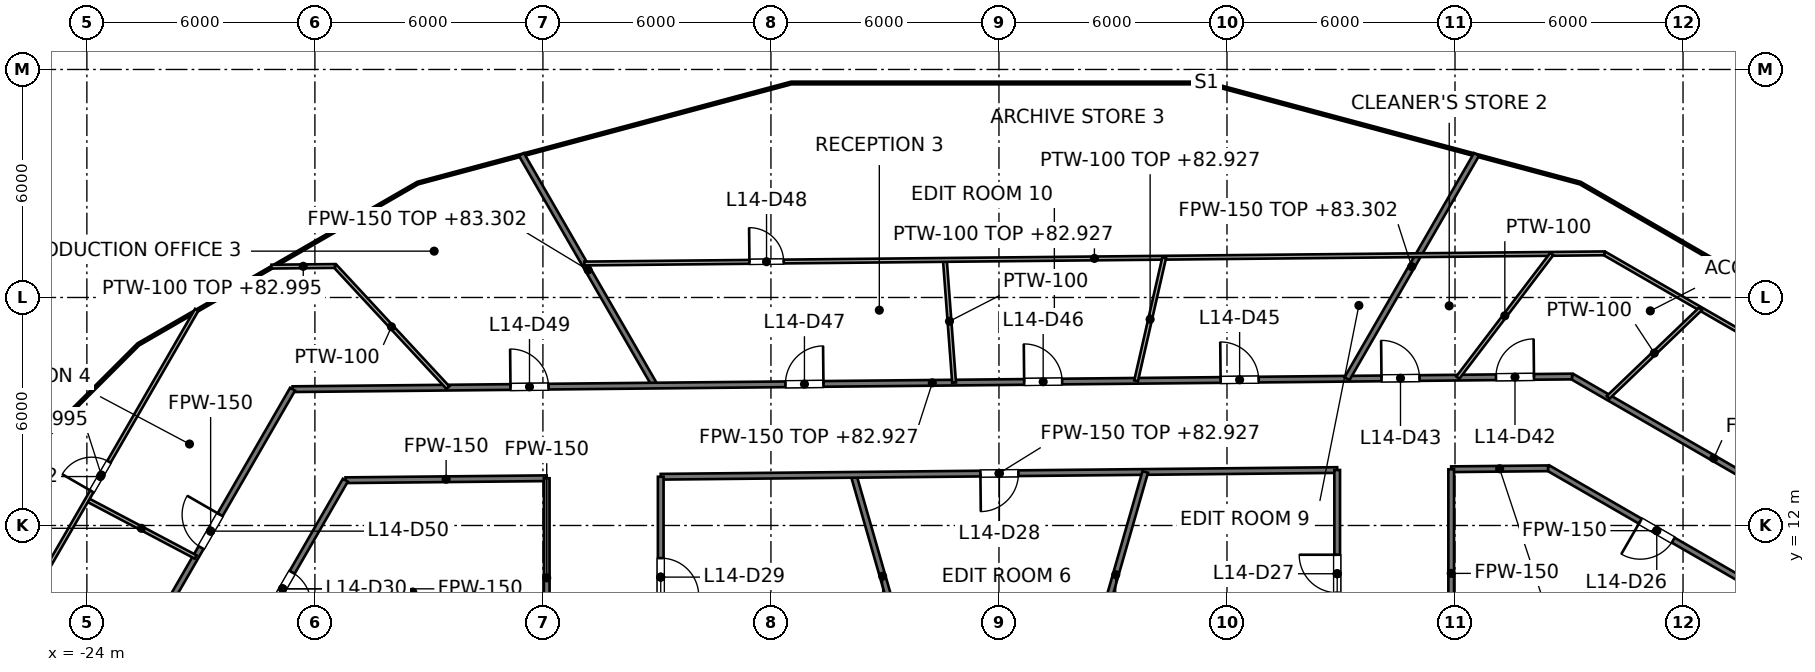
"""IFC4 building model, lengths in metres.
Left out: names, types, materials, properties, quantities, classifications, styles, units other than length and angle.
Written with IfcOpenShell. Run it as: python <this file> out.ifc"""

import sys

from ifc_helpers import new_model, si_unit, direction, frame, frame_2d, origin, place, context, subcontext, project, spatial, rectangle, extrude, element, fill, save


model = new_model("IFC4")
c1 = context("Model", 3, precision=1e-05, world=origin(), true_north=direction((0.0, 1.0)))
c2 = subcontext(c1, "Body", "Model", "MODEL_VIEW")
j1 = project(units=[si_unit("LENGTHUNIT", "METRE"), si_unit("PLANEANGLEUNIT", "RADIAN")], contexts=[c1])
p1 = place(None, origin())
s1 = spatial("IfcSite", under=j1, at=p1, CompositionType="ELEMENT")
p2 = place(p1, origin())
s2 = spatial("IfcBuilding", under=s1, at=p2, CompositionType="ELEMENT")
p3 = place(p2, frame((0.0, 0.0, 79.8)))
s3 = spatial("IfcBuildingStorey", under=s2, at=p3, CompositionType="ELEMENT", Elevation=79.8)
p4 = place(p3, frame((-3.827, 13.333, 0.0), z_axis=(0.0, 0.0, 1.0), x_axis=(0.275935525478, -0.961176147113, 0.0)))
e1 = element("IfcWall", 1, at=p4, inside=s3, PredefinedType="PARTITIONING", context=c2, shape_type="SweptSolid", body=[
    extrude(rectangle(XDim=5.548, YDim=0.15, at=frame_2d((2.774, 0.0))), origin(), (0.0, 0.0, 1.0), 4.05),
])
p5 = place(p3, frame((-12.565, 21.763, 0.0), z_axis=(0.0, 0.0, 1.0), x_axis=(0.500009374365, -0.866019991425, 0.0)))
e2 = element("IfcWall", 2, at=p5, inside=s3, PredefinedType="PARTITIONING", context=c2, shape_type="SweptSolid", body=[
    extrude(rectangle(XDim=7.022, YDim=0.15, at=frame_2d((3.511, 0.0))), origin(), (0.0, 0.0, 1.0), 3.502),
])
p6 = place(p3, frame((14.448, 13.515, 0.0), z_axis=(0.0, 0.0, 1.0), x_axis=(0.865975016585, -0.500087263036, 0.0)))
e3 = element("IfcWall", 3, at=p6, inside=s3, PredefinedType="PARTITIONING", context=c2, shape_type="SweptSolid", body=[
    extrude(rectangle(XDim=6.604, YDim=0.15, at=frame_2d((3.302, 0.0))), origin(), (0.0, 0.0, 1.0), 3.195),
])
p7 = place(p6, frame((2.803, 0.0, 0.0)))
e4 = element("IfcOpeningElement", 4, at=p7, cuts=e3, PredefinedType="OPENING", context=c2, shape_type="SweptSolid", body=[
    extrude(rectangle(XDim=1.0, YDim=2.1, at=frame_2d((0.5, 1.05))), frame((0.0, 0.075, 0.0), z_axis=(0.0, -1.0, 0.0), x_axis=(1.0, 0.0, 0.0)), (0.0, 0.0, 1.0), 0.15),
])
p8 = place(p3, frame((15.08, 15.921, 0.0), z_axis=(0.0, 0.0, 1.0), x_axis=(0.865982112089, -0.50007497592, 0.0)))
e5 = element("IfcWall", 5, at=p8, inside=s3, PredefinedType="PARTITIONING", context=c2, shape_type="SweptSolid", body=[
    extrude(rectangle(XDim=8.613, YDim=0.15, at=frame_2d((4.306, 0.0))), origin(), (0.0, 0.0, 1.0), 3.195),
])
p9 = place(p3, frame((-17.194, 13.191, 0.0), z_axis=(0.0, 0.0, 1.0), x_axis=(0.999950853109, 0.009914200296, 0.0)))
e6 = element("IfcWall", 6, at=p9, inside=s3, PredefinedType="PARTITIONING", context=c2, shape_type="SweptSolid", body=[
    extrude(rectangle(XDim=5.294, YDim=0.15, at=frame_2d((2.647, 0.0))), origin(), (0.0, 0.0, 1.0), 3.195),
])
p10 = place(p3, frame((-8.9, 13.282, 0.0), z_axis=(0.0, 0.0, 1.0), x_axis=(0.999950969978, 0.009902405776, 0.0)))
e7 = element("IfcWall", 7, at=p10, inside=s3, PredefinedType="PARTITIONING", context=c2, shape_type="SweptSolid", body=[
    extrude(rectangle(XDim=17.801, YDim=0.15, at=frame_2d((8.9, 0.0))), origin(), (0.0, 0.0, 1.0), 3.127),
])
p11 = place(p10, frame((8.412, 0.0, 0.0)))
e8 = element("IfcOpeningElement", 8, at=p11, cuts=e7, PredefinedType="OPENING", context=c2, shape_type="SweptSolid", body=[
    extrude(rectangle(XDim=1.0, YDim=2.1, at=frame_2d((0.5, 1.05))), frame((0.0, 0.075, 0.0), z_axis=(0.0, -1.0, 0.0), x_axis=(1.0, 0.0, 0.0)), (0.0, 0.0, 1.0), 0.15),
])
p12 = place(p3, frame((11.9, 13.48, 0.0), z_axis=(0.0, 0.0, 1.0), x_axis=(0.999951307579, 0.009868255694, 0.0)))
e9 = element("IfcWall", 9, at=p12, inside=s3, PredefinedType="PARTITIONING", context=c2, shape_type="SweptSolid", body=[
    extrude(rectangle(XDim=2.548, YDim=0.15, at=frame_2d((1.274, 0.0))), origin(), (0.0, 0.0, 1.0), 3.195),
])
p13 = place(p3, frame((-18.587, 15.587, 0.0), z_axis=(0.0, 0.0, 1.0), x_axis=(0.999950941879, 0.009905242833, 0.0)))
e10 = element("IfcWall", 10, at=p13, inside=s3, PredefinedType="PARTITIONING", context=c2, shape_type="SweptSolid", body=[
    extrude(rectangle(XDim=33.669, YDim=0.15, at=frame_2d((16.834, 0.0))), origin(), (0.0, 0.0, 1.0), 3.127),
])
p14 = place(p13, frame((31.667, 0.0, 0.0)))
e11 = element("IfcOpeningElement", 11, at=p14, cuts=e10, PredefinedType="OPENING", context=c2, shape_type="SweptSolid", body=[
    extrude(rectangle(XDim=1.0, YDim=2.1, at=frame_2d((0.5, 1.05))), frame((0.0, 0.075, 0.0), z_axis=(0.0, -1.0, 0.0), x_axis=(1.0, 0.0, 0.0)), (0.0, 0.0, 1.0), 0.15),
])
p15 = place(p13, frame((28.654, 0.0, 0.0)))
e12 = element("IfcOpeningElement", 12, at=p15, cuts=e10, PredefinedType="OPENING", context=c2, shape_type="SweptSolid", body=[
    extrude(rectangle(XDim=1.0, YDim=2.1, at=frame_2d((0.5, 1.05))), frame((0.0, 0.075, 0.0), z_axis=(0.0, -1.0, 0.0), x_axis=(1.0, 0.0, 0.0)), (0.0, 0.0, 1.0), 0.15),
])
p16 = place(p13, frame((24.421, 0.0, 0.0)))
e13 = element("IfcOpeningElement", 13, at=p16, cuts=e10, PredefinedType="OPENING", context=c2, shape_type="SweptSolid", body=[
    extrude(rectangle(XDim=1.0, YDim=2.1, at=frame_2d((0.5, 1.05))), frame((0.0, 0.075, 0.0), z_axis=(0.0, -1.0, 0.0), x_axis=(1.0, 0.0, 0.0)), (0.0, 0.0, 1.0), 0.15),
])
p17 = place(p13, frame((19.251, 0.0, 0.0)))
e14 = element("IfcOpeningElement", 14, at=p17, cuts=e10, PredefinedType="OPENING", context=c2, shape_type="SweptSolid", body=[
    extrude(rectangle(XDim=1.0, YDim=2.1, at=frame_2d((0.5, 1.05))), frame((0.0, 0.075, 0.0), z_axis=(0.0, -1.0, 0.0), x_axis=(1.0, 0.0, 0.0)), (0.0, 0.0, 1.0), 0.15),
])
p18 = place(p13, frame((12.969, 0.0, 0.0)))
e15 = element("IfcOpeningElement", 15, at=p18, cuts=e10, PredefinedType="OPENING", context=c2, shape_type="SweptSolid", body=[
    extrude(rectangle(XDim=1.0, YDim=2.1, at=frame_2d((0.5, 1.05))), frame((0.0, 0.075, 0.0), z_axis=(0.0, -1.0, 0.0), x_axis=(1.0, 0.0, 0.0)), (0.0, 0.0, 1.0), 0.15),
])
p19 = place(p13, frame((5.734, 0.0, 0.0)))
e16 = element("IfcOpeningElement", 16, at=p19, cuts=e10, PredefinedType="OPENING", context=c2, shape_type="SweptSolid", body=[
    extrude(rectangle(XDim=1.0, YDim=2.1, at=frame_2d((0.5, 1.05))), frame((0.0, 0.075, 0.0), z_axis=(0.0, -1.0, 0.0), x_axis=(1.0, 0.0, 0.0)), (0.0, 0.0, 1.0), 0.15),
])
p20 = place(p3, frame((9.158, 15.862, 0.0), z_axis=(0.0, 0.0, 1.0), x_axis=(0.499996416451, 0.866027472737, 0.0)))
e17 = element("IfcWall", 17, at=p20, inside=s3, PredefinedType="PARTITIONING", context=c2, shape_type="SweptSolid", body=[
    extrude(rectangle(XDim=6.814, YDim=0.15, at=frame_2d((3.407, 0.0))), origin(), (0.0, 0.0, 1.0), 3.502),
])
p21 = place(p3, frame((-20.5, 7.474, 0.0), z_axis=(0.0, 0.0, 1.0), x_axis=(0.500012665616, 0.866018091164, 0.0)))
e18 = element("IfcWall", 18, at=p21, inside=s3, PredefinedType="PARTITIONING", context=c2, shape_type="SweptSolid", body=[
    extrude(rectangle(XDim=6.602, YDim=0.15, at=frame_2d((3.301, 0.0))), origin(), (0.0, 0.0, 1.0), 3.195),
])
p22 = place(p21, frame((2.803, 0.0, 0.0)))
e19 = element("IfcOpeningElement", 19, at=p22, cuts=e18, PredefinedType="OPENING", context=c2, shape_type="SweptSolid", body=[
    extrude(rectangle(XDim=1.0, YDim=2.1, at=frame_2d((0.5, 1.05))), frame((0.0, 0.075, 0.0), z_axis=(0.0, -1.0, 0.0), x_axis=(1.0, 0.0, 0.0)), (0.0, 0.0, 1.0), 0.15),
])
p23 = place(p3, frame((-22.9, 8.117, 0.0), z_axis=(0.0, 0.0, 1.0), x_axis=(0.499983791763, 0.866034761412, 0.0)))
e20 = element("IfcWall", 20, at=p23, inside=s3, PredefinedType="PARTITIONING", context=c2, shape_type="SweptSolid", body=[
    extrude(rectangle(XDim=8.626, YDim=0.15, at=frame_2d((4.313, 0.0))), origin(), (0.0, 0.0, 1.0), 3.195),
])
p24 = place(p23, frame((3.812, 0.0, 0.0)))
e21 = element("IfcOpeningElement", 21, at=p24, cuts=e20, PredefinedType="OPENING", context=c2, shape_type="SweptSolid", body=[
    extrude(rectangle(XDim=1.0, YDim=2.1, at=frame_2d((0.5, 1.05))), frame((0.0, 0.075, 0.0), z_axis=(0.0, -1.0, 0.0), x_axis=(1.0, 0.0, 0.0)), (0.0, 0.0, 1.0), 0.15),
])
p25 = place(p23, frame((1.213, 0.0, 0.0)))
e22 = element("IfcOpeningElement", 22, at=p25, cuts=e20, PredefinedType="OPENING", context=c2, shape_type="SweptSolid", body=[
    extrude(rectangle(XDim=1.0, YDim=2.1, at=frame_2d((0.5, 1.05))), frame((0.0, 0.075, 0.0), z_axis=(0.0, -1.0, 0.0), x_axis=(1.0, 0.0, 0.0)), (0.0, 0.0, 1.0), 0.15),
])
p26 = place(p3, frame((2.296, 8.0, 0.0), z_axis=(0.0, 0.0, 1.0), x_axis=(0.275958345059, 0.961169595749, 0.0)))
e23 = element("IfcWall", 23, at=p26, inside=s3, PredefinedType="PARTITIONING", context=c2, shape_type="SweptSolid", body=[
    extrude(rectangle(XDim=5.628, YDim=0.15, at=frame_2d((2.814, 0.0))), origin(), (0.0, 0.0, 1.0), 4.05),
])
p27 = place(p3, frame((11.9, 8.0, 0.0), z_axis=(0.0, 0.0, 1.0), x_axis=(0.0, 1.0, 0.0)))
e24 = element("IfcWall", 24, at=p27, inside=s3, PredefinedType="PARTITIONING", context=c2, shape_type="SweptSolid", body=[
    extrude(rectangle(XDim=5.479, YDim=0.15, at=frame_2d((2.74, 0.0))), origin(), (0.0, 0.0, 1.0), 3.195),
])
p28 = place(p3, frame((8.9, 8.0, 0.0), z_axis=(0.0, 0.0, 1.0), x_axis=(0.0, 1.0, 0.0)))
e25 = element("IfcWall", 25, at=p28, inside=s3, PredefinedType="PARTITIONING", context=c2, shape_type="SweptSolid", body=[
    extrude(rectangle(XDim=5.46, YDim=0.15, at=frame_2d((2.73, 0.0))), origin(), (0.0, 0.0, 1.0), 3.127),
])
p29 = place(p28, frame((2.23, 0.0, 0.0)))
e26 = element("IfcOpeningElement", 26, at=p29, cuts=e25, PredefinedType="OPENING", context=c2, shape_type="SweptSolid", body=[
    extrude(rectangle(XDim=1.0, YDim=2.1, at=frame_2d((0.5, 1.05))), frame((0.0, 0.075, 0.0), z_axis=(0.0, -1.0, 0.0), x_axis=(1.0, 0.0, 0.0)), (0.0, 0.0, 1.0), 0.15),
])
p30 = place(p3, frame((-8.9, 8.0, 0.0), z_axis=(0.0, 0.0, 1.0), x_axis=(0.0, 1.0, 0.0)))
e27 = element("IfcWall", 27, at=p30, inside=s3, PredefinedType="PARTITIONING", context=c2, shape_type="SweptSolid", body=[
    extrude(rectangle(XDim=5.283, YDim=0.15, at=frame_2d((2.642, 0.0))), origin(), (0.0, 0.0, 1.0), 3.127),
])
p31 = place(p30, frame((2.142, 0.0, 0.0)))
e28 = element("IfcOpeningElement", 28, at=p31, cuts=e27, PredefinedType="OPENING", context=c2, shape_type="SweptSolid", body=[
    extrude(rectangle(XDim=1.0, YDim=2.1, at=frame_2d((0.5, 1.05))), frame((0.0, 0.075, 0.0), z_axis=(0.0, -1.0, 0.0), x_axis=(1.0, 0.0, 0.0)), (0.0, 0.0, 1.0), 0.15),
])
p32 = place(p3, frame((-11.9, 8.0, 0.0), z_axis=(0.0, 0.0, 1.0), x_axis=(0.0, 1.0, 0.0)))
e29 = element("IfcWall", 29, at=p32, inside=s3, PredefinedType="PARTITIONING", context=c2, shape_type="SweptSolid", body=[
    extrude(rectangle(XDim=5.243, YDim=0.15, at=frame_2d((2.622, 0.0))), origin(), (0.0, 0.0, 1.0), 3.195),
])
p33 = place(p3, frame((-1.423, 18.988, 0.0), z_axis=(0.0, 0.0, 1.0), x_axis=(0.074816197408, -0.997197340854, 0.0)))
e30 = element("IfcWall", 30, at=p33, inside=s3, PredefinedType="PARTITIONING", context=c2, shape_type="SweptSolid", body=[
    extrude(rectangle(XDim=3.237, YDim=0.1, at=frame_2d((1.619, 0.0))), origin(), (0.0, 0.0, 1.0), 4.05),
])
p34 = place(p3, frame((-17.47, 18.829, 0.0), z_axis=(0.0, 0.0, 1.0), x_axis=(0.680137944576, -0.73308415366, 0.0)))
e31 = element("IfcWall", 31, at=p34, inside=s3, PredefinedType="PARTITIONING", context=c2, shape_type="SweptSolid", body=[
    extrude(rectangle(XDim=4.367, YDim=0.1, at=frame_2d((2.183, 0.0))), origin(), (0.0, 0.0, 1.0), 4.05),
])
p35 = place(p3, frame((15.931, 19.16, 0.0), z_axis=(0.0, 0.0, 1.0), x_axis=(0.866053377516, -0.499951544945, 0.0)))
e32 = element("IfcWall", 32, at=p35, inside=s3, PredefinedType="PARTITIONING", context=c2, shape_type="SweptSolid", body=[
    extrude(rectangle(XDim=11.316, YDim=0.1, at=frame_2d((5.658, 0.0))), origin(), (0.0, 0.0, 1.0), 3.195),
])
p36 = place(p3, frame((-23.994, 12.681, 0.0), z_axis=(0.0, 0.0, 1.0), x_axis=(0.884105641911, -0.467287078723, 0.0)))
e33 = element("IfcWall", 33, at=p36, inside=s3, PredefinedType="PARTITIONING", context=c2, shape_type="SweptSolid", body=[
    extrude(rectangle(XDim=3.231, YDim=0.1, at=frame_2d((1.616, 0.0))), origin(), (0.0, 0.0, 1.0), 4.05),
])
p37 = place(p3, frame((-19.143, 18.812, 0.0), z_axis=(0.0, 0.0, 1.0), x_axis=(0.999950774028, 0.009922173155, 0.0)))
e34 = element("IfcWall", 34, at=p37, inside=s3, PredefinedType="PARTITIONING", context=c2, shape_type="SweptSolid", body=[
    extrude(rectangle(XDim=1.673, YDim=0.1, at=frame_2d((0.836, 0.0))), origin(), (0.0, 0.0, 1.0), 3.195),
])
p38 = place(p3, frame((-10.908, 18.894, 0.0), z_axis=(0.0, 0.0, 1.0), x_axis=(0.999950305253, 0.009969304066, 0.0)))
e35 = element("IfcWall", 35, at=p38, inside=s3, PredefinedType="PARTITIONING", context=c2, shape_type="SweptSolid", body=[
    extrude(rectangle(XDim=26.84, YDim=0.1, at=frame_2d((13.42, 0.0))), origin(), (0.0, 0.0, 1.0), 3.127),
])
p39 = place(p38, frame((4.342, 0.0, 0.0)))
e36 = element("IfcOpeningElement", 36, at=p39, cuts=e35, PredefinedType="OPENING", context=c2, shape_type="SweptSolid", body=[
    extrude(rectangle(XDim=0.9, YDim=2.1, at=frame_2d((0.45, 1.05))), frame((0.0, 0.05, 0.0), z_axis=(0.0, -1.0, 0.0), x_axis=(1.0, 0.0, 0.0)), (0.0, 0.0, 1.0), 0.1),
])
p40 = place(p3, frame((16.03, 15.372, 0.0), z_axis=(0.0, 0.0, 1.0), x_axis=(0.721823579431, 0.692077105659, 0.0)))
e37 = element("IfcWall", 37, at=p40, inside=s3, PredefinedType="PARTITIONING", context=c2, shape_type="SweptSolid", body=[
    extrude(rectangle(XDim=3.365, YDim=0.1, at=frame_2d((1.683, 0.0))), origin(), (0.0, 0.0, 1.0), 4.05),
])
p41 = place(p3, frame((12.074, 15.891, 0.0), z_axis=(0.0, 0.0, 1.0), x_axis=(0.605146856107, 0.796113862801, 0.0)))
e38 = element("IfcWall", 38, at=p41, inside=s3, PredefinedType="PARTITIONING", context=c2, shape_type="SweptSolid", body=[
    extrude(rectangle(XDim=4.088, YDim=0.1, at=frame_2d((2.044, 0.0))), origin(), (0.0, 0.0, 1.0), 4.05),
])
p42 = place(p3, frame((-26.13, 8.983, 0.0), z_axis=(0.0, 0.0, 1.0), x_axis=(0.500107000949, 0.865963617944, 0.0)))
e39 = element("IfcWall", 39, at=p42, inside=s3, PredefinedType="PARTITIONING", context=c2, shape_type="SweptSolid", body=[
    extrude(rectangle(XDim=10.038, YDim=0.1, at=frame_2d((5.019, 0.0))), origin(), (0.0, 0.0, 1.0), 3.195),
])
p43 = place(p42, frame((4.521, 0.0, 0.0)))
e40 = element("IfcOpeningElement", 40, at=p43, cuts=e39, PredefinedType="OPENING", context=c2, shape_type="SweptSolid", body=[
    extrude(rectangle(XDim=0.9, YDim=2.1, at=frame_2d((0.45, 1.05))), frame((0.0, 0.05, 0.0), z_axis=(0.0, -1.0, 0.0), x_axis=(1.0, 0.0, 0.0)), (0.0, 0.0, 1.0), 0.1),
])
p44 = place(p3, frame((3.608, 15.807, 0.0), z_axis=(0.0, 0.0, 1.0), x_axis=(0.222507435416, 0.974930993037, 0.0)))
e41 = element("IfcWall", 41, at=p44, inside=s3, PredefinedType="PARTITIONING", context=c2, shape_type="SweptSolid", body=[
    extrude(rectangle(XDim=3.321, YDim=0.1, at=frame_2d((1.661, 0.0))), origin(), (0.0, 0.0, 1.0), 3.127),
])
p45 = place(p7, origin())
e42 = element("IfcDoor", 42, at=p45, inside=s3, OperationType="SINGLE_SWING_LEFT", PredefinedType="DOOR", context=c2, shape_type="SweptSolid", body=[
    extrude(rectangle(XDim=1.0, YDim=2.1, at=frame_2d((0.5, 1.05))), frame((0.0, 0.025, 0.0), z_axis=(0.0, -1.0, 0.0), x_axis=(1.0, 0.0, 0.0)), (0.0, 0.0, 1.0), 0.05),
])
fill(e4, e42)
p46 = place(p29, origin())
e43 = element("IfcDoor", 43, at=p46, inside=s3, OperationType="SINGLE_SWING_RIGHT", PredefinedType="DOOR", context=c2, shape_type="SweptSolid", body=[
    extrude(rectangle(XDim=1.0, YDim=2.1, at=frame_2d((0.5, 1.05))), frame((0.0, 0.025, 0.0), z_axis=(0.0, -1.0, 0.0), x_axis=(1.0, 0.0, 0.0)), (0.0, 0.0, 1.0), 0.05),
])
fill(e26, e43)
p47 = place(p11, origin())
e44 = element("IfcDoor", 44, at=p47, inside=s3, OperationType="SINGLE_SWING_LEFT", PredefinedType="DOOR", context=c2, shape_type="SweptSolid", body=[
    extrude(rectangle(XDim=1.0, YDim=2.1, at=frame_2d((0.5, 1.05))), frame((0.0, 0.025, 0.0), z_axis=(0.0, -1.0, 0.0), x_axis=(1.0, 0.0, 0.0)), (0.0, 0.0, 1.0), 0.05),
])
fill(e8, e44)
p48 = place(p31, origin())
e45 = element("IfcDoor", 45, at=p48, inside=s3, OperationType="SINGLE_SWING_LEFT", PredefinedType="DOOR", context=c2, shape_type="SweptSolid", body=[
    extrude(rectangle(XDim=1.0, YDim=2.1, at=frame_2d((0.5, 1.05))), frame((0.0, 0.025, 0.0), z_axis=(0.0, -1.0, 0.0), x_axis=(1.0, 0.0, 0.0)), (0.0, 0.0, 1.0), 0.05),
])
fill(e28, e45)
p49 = place(p22, origin())
e46 = element("IfcDoor", 46, at=p49, inside=s3, OperationType="SINGLE_SWING_LEFT", PredefinedType="DOOR", context=c2, shape_type="SweptSolid", body=[
    extrude(rectangle(XDim=1.0, YDim=2.1, at=frame_2d((0.5, 1.05))), frame((0.0, 0.025, 0.0), z_axis=(0.0, -1.0, 0.0), x_axis=(1.0, 0.0, 0.0)), (0.0, 0.0, 1.0), 0.05),
])
fill(e19, e46)
p50 = place(p14, origin())
e47 = element("IfcDoor", 47, at=p50, inside=s3, OperationType="SINGLE_SWING_RIGHT", PredefinedType="DOOR", context=c2, shape_type="SweptSolid", body=[
    extrude(rectangle(XDim=1.0, YDim=2.1, at=frame_2d((0.5, 1.05))), frame((0.0, 0.025, 0.0), z_axis=(0.0, -1.0, 0.0), x_axis=(1.0, 0.0, 0.0)), (0.0, 0.0, 1.0), 0.05),
])
fill(e11, e47)
p51 = place(p15, origin())
e48 = element("IfcDoor", 48, at=p51, inside=s3, OperationType="SINGLE_SWING_LEFT", PredefinedType="DOOR", context=c2, shape_type="SweptSolid", body=[
    extrude(rectangle(XDim=1.0, YDim=2.1, at=frame_2d((0.5, 1.05))), frame((0.0, 0.025, 0.0), z_axis=(0.0, -1.0, 0.0), x_axis=(1.0, 0.0, 0.0)), (0.0, 0.0, 1.0), 0.05),
])
fill(e12, e48)
p52 = place(p16, origin())
e49 = element("IfcDoor", 49, at=p52, inside=s3, OperationType="SINGLE_SWING_LEFT", PredefinedType="DOOR", context=c2, shape_type="SweptSolid", body=[
    extrude(rectangle(XDim=1.0, YDim=2.1, at=frame_2d((0.5, 1.05))), frame((0.0, 0.025, 0.0), z_axis=(0.0, -1.0, 0.0), x_axis=(1.0, 0.0, 0.0)), (0.0, 0.0, 1.0), 0.05),
])
fill(e13, e49)
p53 = place(p17, origin())
e50 = element("IfcDoor", 50, at=p53, inside=s3, OperationType="SINGLE_SWING_LEFT", PredefinedType="DOOR", context=c2, shape_type="SweptSolid", body=[
    extrude(rectangle(XDim=1.0, YDim=2.1, at=frame_2d((0.5, 1.05))), frame((0.0, 0.025, 0.0), z_axis=(0.0, -1.0, 0.0), x_axis=(1.0, 0.0, 0.0)), (0.0, 0.0, 1.0), 0.05),
])
fill(e14, e50)
p54 = place(p18, origin())
e51 = element("IfcDoor", 51, at=p54, inside=s3, OperationType="SINGLE_SWING_RIGHT", PredefinedType="DOOR", context=c2, shape_type="SweptSolid", body=[
    extrude(rectangle(XDim=1.0, YDim=2.1, at=frame_2d((0.5, 1.05))), frame((0.0, 0.025, 0.0), z_axis=(0.0, -1.0, 0.0), x_axis=(1.0, 0.0, 0.0)), (0.0, 0.0, 1.0), 0.05),
])
fill(e15, e51)
p55 = place(p39, origin())
e52 = element("IfcDoor", 52, at=p55, inside=s3, OperationType="SINGLE_SWING_LEFT", PredefinedType="DOOR", context=c2, shape_type="SweptSolid", body=[
    extrude(rectangle(XDim=0.9, YDim=2.1, at=frame_2d((0.45, 1.05))), frame((0.0, 0.025, 0.0), z_axis=(0.0, -1.0, 0.0), x_axis=(1.0, 0.0, 0.0)), (0.0, 0.0, 1.0), 0.05),
])
fill(e36, e52)
p56 = place(p19, origin())
e53 = element("IfcDoor", 53, at=p56, inside=s3, OperationType="SINGLE_SWING_LEFT", PredefinedType="DOOR", context=c2, shape_type="SweptSolid", body=[
    extrude(rectangle(XDim=1.0, YDim=2.1, at=frame_2d((0.5, 1.05))), frame((0.0, 0.025, 0.0), z_axis=(0.0, -1.0, 0.0), x_axis=(1.0, 0.0, 0.0)), (0.0, 0.0, 1.0), 0.05),
])
fill(e16, e53)
p57 = place(p24, origin())
e54 = element("IfcDoor", 54, at=p57, inside=s3, OperationType="SINGLE_SWING_RIGHT", PredefinedType="DOOR", context=c2, shape_type="SweptSolid", body=[
    extrude(rectangle(XDim=1.0, YDim=2.1, at=frame_2d((0.5, 1.05))), frame((0.0, 0.025, 0.0), z_axis=(0.0, -1.0, 0.0), x_axis=(1.0, 0.0, 0.0)), (0.0, 0.0, 1.0), 0.05),
])
fill(e21, e54)
p58 = place(p43, origin())
e55 = element("IfcDoor", 55, at=p58, inside=s3, OperationType="SINGLE_SWING_LEFT", PredefinedType="DOOR", context=c2, shape_type="SweptSolid", body=[
    extrude(rectangle(XDim=0.9, YDim=2.1, at=frame_2d((0.45, 1.05))), frame((0.0, 0.025, 0.0), z_axis=(0.0, -1.0, 0.0), x_axis=(1.0, 0.0, 0.0)), (0.0, 0.0, 1.0), 0.05),
])
fill(e40, e55)
save(model, sys.argv[1])
